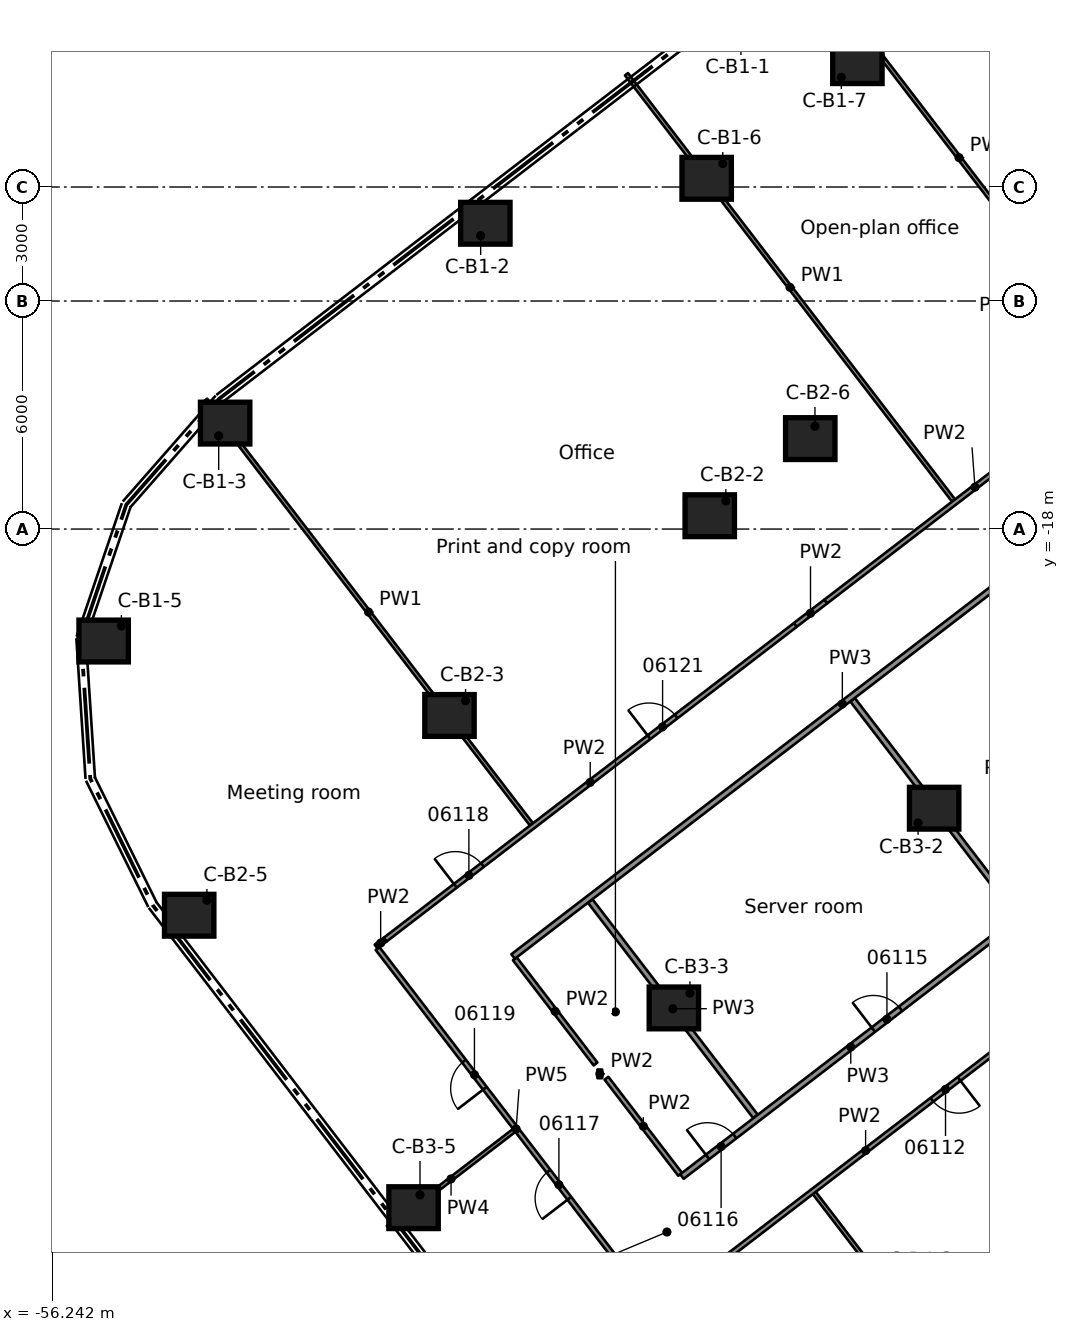
"""IFC4 building model, lengths in metres.
Left out: names, types, materials, properties, quantities, classifications, styles, units other than length and angle.
Written with IfcOpenShell. Run it as: python <this file> out.ifc"""

import sys

from ifc_helpers import new_model, si_unit, direction, frame, frame_2d, origin, origin_2d, place, context, subcontext, project, spatial, rectangle, extrude, element, fill, save


model = new_model("IFC4")
c1 = context("Model", 3, precision=1e-05, world=origin(), true_north=direction((0.0, 1.0)))
c2 = subcontext(c1, "Body", "Model", "MODEL_VIEW")
j1 = project(units=[si_unit("LENGTHUNIT", "METRE"), si_unit("PLANEANGLEUNIT", "RADIAN")], contexts=[c1])
p1 = place(None, origin())
s1 = spatial("IfcSite", under=j1, at=p1, CompositionType="ELEMENT")
p2 = place(p1, origin())
s2 = spatial("IfcBuilding", under=s1, at=p2, CompositionType="ELEMENT")
p3 = place(p2, frame((0.0, 0.0, 29.2)))
s3 = spatial("IfcBuildingStorey", under=s2, at=p3, CompositionType="ELEMENT", Elevation=29.2)
for number, where, z_axis, x_axis in (
    (1, (-44.84, -9.954, 0.0), (0.0, 0.0, 1.0), (1.0, 0.0, 0.0)),
    (2, (-51.687, -15.212, 0.0), (0.0, 0.0, 1.0), (1.0, 0.0, 0.0)),
    (3, (-54.884, -20.946, 0.0), (0.0, 0.0, 1.0), (1.0, 0.0, 0.0)),
    (4, (-39.016, -8.771, 0.0), (0.0, 0.0, 1.0), (1.0, 0.0, 0.0)),
    (5, (-35.05, -5.727, 0.0), (0.0, 0.0, 1.0), (1.0, 0.0, 0.0)),
    (6, (-38.935, -17.649, 0.0), (0.0, 0.0, 1.0), (1.0, 0.0, 0.0)),
    (7, (-45.784, -22.905, 0.0), (0.0, 0.0, 1.0), (1.0, 0.0, 0.0)),
    (8, (-52.633, -28.161, 0.0), (0.0, 0.0, 1.0), (1.0, 0.0, 0.0)),
    (9, (-36.29, -15.62, 0.0), (0.0, 0.0, 1.0), (1.0, 0.0, 0.0)),
    (10, (-33.03, -25.345, 0.0), (0.0, 0.0, 1.0), (1.0, 0.0, 0.0)),
    (11, (-39.879, -30.6, 0.0), (0.0, 0.0, 1.0), (1.0, 0.0, 0.0)),
    (12, (-46.729, -35.856, 0.0), (0.0, 0.0, 1.0), (1.0, 0.0, 0.0)),
):
    element("IfcColumn", number, at=place(p3, frame(where, z_axis=z_axis, x_axis=x_axis)), inside=s3, PredefinedType="COLUMN", context=c2, shape_type="SweptSolid", body=[
        extrude(rectangle(XDim=1.3, YDim=1.1, at=origin_2d()), origin(), (0.0, 0.0, 1.0), 4.1),
    ])
p4 = place(p3, frame((-40.384, -38.535, 0.0), z_axis=(0.0, 0.0, 1.0), x_axis=(-0.609026744184, 0.793149686294, 0.0)))
e13 = element("IfcWall", 13, at=p4, inside=s3, PredefinedType="PARTITIONING", context=c2, shape_type="SweptSolid", body=[
    extrude(rectangle(XDim=11.975, YDim=0.125, at=frame_2d((5.987, 0.0))), origin(), (0.0, 0.0, 1.0), 3.049),
])
p5 = place(p4, frame((3.688, 0.0, 0.0)))
e14 = element("IfcOpeningElement", 14, at=p5, cuts=e13, PredefinedType="OPENING", context=c2, shape_type="SweptSolid", body=[
    extrude(rectangle(XDim=0.9, YDim=2.1, at=frame_2d((0.45, 1.05))), frame((0.0, 0.073, 0.0), z_axis=(0.0, -1.0, 0.0), x_axis=(1.0, 0.0, 0.0)), (0.0, 0.0, 1.0), 0.145),
])
p6 = place(p4, frame((7.338, 0.0, 0.0)))
e15 = element("IfcOpeningElement", 15, at=p6, cuts=e13, PredefinedType="OPENING", context=c2, shape_type="SweptSolid", body=[
    extrude(rectangle(XDim=0.9, YDim=2.1, at=frame_2d((0.45, 1.05))), frame((0.0, 0.073, 0.0), z_axis=(0.0, -1.0, 0.0), x_axis=(1.0, 0.0, 0.0)), (0.0, 0.0, 1.0), 0.145),
])
p7 = place(p3, frame((-44.064, -29.307, 0.0), z_axis=(0.0, 0.0, 1.0), x_axis=(0.608587271244, -0.793486945879, 0.0)))
e16 = element("IfcWall", 16, at=p7, inside=s3, PredefinedType="PARTITIONING", context=c2, shape_type="SweptSolid", body=[
    extrude(rectangle(XDim=3.489, YDim=0.125, at=frame_2d((1.744, 0.0))), origin(), (0.0, 0.0, 1.0), 3.66),
])
p8 = place(p3, frame((-41.653, -32.45, 0.0), z_axis=(0.0, 0.0, 1.0), x_axis=(0.60867753108, -0.793417710389, 0.0)))
e17 = element("IfcWall", 17, at=p8, inside=s3, PredefinedType="PARTITIONING", context=c2, shape_type="SweptSolid", body=[
    extrude(rectangle(XDim=3.188, YDim=0.125, at=frame_2d((1.594, 0.0))), origin(), (0.0, 0.0, 1.0), 3.66),
])
p9 = place(p3, frame((-52.2, -14.599, 0.0), z_axis=(0.0, 0.0, 1.0), x_axis=(0.608818023879, -0.793309910312, 0.0)))
e18 = element("IfcWall", 18, at=p9, inside=s3, PredefinedType="PARTITIONING", context=c2, shape_type="SweptSolid", body=[
    extrude(rectangle(XDim=14.081, YDim=0.1, at=frame_2d((7.041, 0.0))), origin(), (0.0, 0.0, 1.0), 3.66),
])
p10 = place(p3, frame((-42.081, -27.786, 0.0), z_axis=(0.0, 0.0, 1.0), x_axis=(0.608779288924, -0.793339635577, 0.0)))
e19 = element("IfcWall", 19, at=p10, inside=s3, PredefinedType="PARTITIONING", context=c2, shape_type="SweptSolid", body=[
    extrude(rectangle(XDim=7.147, YDim=0.15, at=frame_2d((3.574, 0.0))), origin(), (0.0, 0.0, 1.0), 3.66),
])
p11 = place(p3, frame((-36.184, -35.471, 0.0), z_axis=(0.0, 0.0, 1.0), x_axis=(0.608732507749, -0.793375531517, 0.0)))
e20 = element("IfcWall", 20, at=p11, inside=s3, PredefinedType="PARTITIONING", context=c2, shape_type="SweptSolid", body=[
    extrude(rectangle(XDim=14.082, YDim=0.1, at=frame_2d((7.041, 0.0))), origin(), (0.0, 0.0, 1.0), 3.025),
])
p12 = place(p3, frame((-35.179, -22.489, 0.0), z_axis=(0.0, 0.0, 1.0), x_axis=(0.608729798771, -0.793377610024, 0.0)))
e21 = element("IfcWall", 21, at=p12, inside=s3, PredefinedType="PARTITIONING", context=c2, shape_type="SweptSolid", body=[
    extrude(rectangle(XDim=7.148, YDim=0.15, at=frame_2d((3.574, 0.0))), origin(), (0.0, 0.0, 1.0), 3.66),
])
p13 = place(p3, frame((-41.126, -6.033, 0.0), z_axis=(0.0, 0.0, 1.0), x_axis=(0.608775561638, -0.793342495743, 0.0)))
e22 = element("IfcWall", 22, at=p13, inside=s3, PredefinedType="PARTITIONING", context=c2, shape_type="SweptSolid", body=[
    extrude(rectangle(XDim=14.136, YDim=0.1, at=frame_2d((7.068, 0.0))), origin(), (0.0, 0.0, 1.0), 3.66),
])
p14 = place(p3, frame((-36.678, -2.62, 0.0), z_axis=(0.0, 0.0, 1.0), x_axis=(0.608783902678, -0.793336095132, 0.0)))
e23 = element("IfcWall", 23, at=p14, inside=s3, PredefinedType="PARTITIONING", context=c2, shape_type="SweptSolid", body=[
    extrude(rectangle(XDim=14.136, YDim=0.1, at=frame_2d((7.068, 0.0))), origin(), (0.0, 0.0, 1.0), 3.66),
])
p15 = place(p3, frame((-29.32, -30.127, 0.0), z_axis=(0.0, 0.0, 1.0), x_axis=(-0.793456491448, -0.608626976217, 0.0)))
e24 = element("IfcWall", 24, at=p15, inside=s3, PredefinedType="PARTITIONING", context=c2, shape_type="SweptSolid", body=[
    extrude(rectangle(XDim=13.898, YDim=0.125, at=frame_2d((6.949, 0.0))), origin(), (0.0, 0.0, 1.0), 3.66),
])
p16 = place(p15, frame((3.849, 0.0, 0.0)))
e25 = element("IfcOpeningElement", 25, at=p16, cuts=e24, PredefinedType="OPENING", context=c2, shape_type="SweptSolid", body=[
    extrude(rectangle(XDim=0.9, YDim=2.1, at=frame_2d((0.45, 1.05))), frame((0.0, 0.073, 0.0), z_axis=(0.0, -1.0, 0.0), x_axis=(1.0, 0.0, 0.0)), (0.0, 0.0, 1.0), 0.145),
])
p17 = place(p3, frame((-39.667, -35.038, 0.0), z_axis=(0.0, 0.0, 1.0), x_axis=(0.793293656215, 0.608839202917, 0.0)))
e26 = element("IfcWall", 26, at=p17, inside=s3, PredefinedType="PARTITIONING", context=c2, shape_type="SweptSolid", body=[
    extrude(rectangle(XDim=11.2, YDim=0.15, at=frame_2d((5.6, 0.0))), origin(), (0.0, 0.0, 1.0), 3.66),
])
p18 = place(p17, frame((6.35, 0.0, 0.0)))
e27 = element("IfcOpeningElement", 27, at=p18, cuts=e26, PredefinedType="OPENING", context=c2, shape_type="SweptSolid", body=[
    extrude(rectangle(XDim=0.9, YDim=2.1, at=frame_2d((0.45, 1.05))), frame((0.0, 0.085, 0.0), z_axis=(0.0, -1.0, 0.0), x_axis=(1.0, 0.0, 0.0)), (0.0, 0.0, 1.0), 0.17),
])
p19 = place(p17, frame((0.85, 0.0, 0.0)))
e28 = element("IfcOpeningElement", 28, at=p19, cuts=e26, PredefinedType="OPENING", context=c2, shape_type="SweptSolid", body=[
    extrude(rectangle(XDim=0.9, YDim=2.1, at=frame_2d((0.45, 1.05))), frame((0.0, 0.085, 0.0), z_axis=(0.0, -1.0, 0.0), x_axis=(1.0, 0.0, 0.0)), (0.0, 0.0, 1.0), 0.17),
])
p20 = place(p3, frame((-47.403, -36.374, 0.0), z_axis=(0.0, 0.0, 1.0), x_axis=(0.793154740431, 0.609020162008, 0.0)))
e29 = element("IfcWall", 29, at=p20, inside=s3, PredefinedType="PARTITIONING", context=c2, shape_type="SweptSolid", body=[
    extrude(rectangle(XDim=4.187, YDim=0.1, at=frame_2d((2.094, 0.0))), origin(), (0.0, 0.0, 1.0), 3.025),
])
p21 = place(p3, frame((-44.11, -29.247, 0.0), z_axis=(0.0, 0.0, 1.0), x_axis=(0.793471030698, 0.608608021179, 0.0)))
e30 = element("IfcWall", 30, at=p21, inside=s3, PredefinedType="PARTITIONING", context=c2, shape_type="SweptSolid", body=[
    extrude(rectangle(XDim=21.838, YDim=0.15, at=frame_2d((10.919, 0.0))), origin(), (0.0, 0.0, 1.0), 3.66),
])
p22 = place(p3, frame((-36.687, -20.524, 0.0), z_axis=(0.0, 0.0, 1.0), x_axis=(0.793579274907, 0.608466872096, 0.0)))
e31 = element("IfcWall", 31, at=p22, inside=s3, PredefinedType="PARTITIONING", context=c2, shape_type="SweptSolid", body=[
    extrude(rectangle(XDim=1.016, YDim=0.125, at=frame_2d((0.508, 0.0))), origin(), (0.0, 0.0, 1.0), 3.66),
])
p23 = place(p3, frame((-47.476, -28.803, 0.0), z_axis=(0.0, 0.0, 1.0), x_axis=(0.793430085013, 0.608661400284, 0.0)))
e32 = element("IfcWall", 32, at=p23, inside=s3, PredefinedType="PARTITIONING", context=c2, shape_type="SweptSolid", body=[
    extrude(rectangle(XDim=13.6, YDim=0.125, at=frame_2d((6.8, 0.0))), origin(), (0.0, 0.0, 1.0), 3.66),
])
p24 = place(p23, frame((2.326, 0.0, 0.0)))
e33 = element("IfcOpeningElement", 33, at=p24, cuts=e32, PredefinedType="OPENING", context=c2, shape_type="SweptSolid", body=[
    extrude(rectangle(XDim=0.9, YDim=2.1, at=frame_2d((0.45, 1.05))), frame((0.0, 0.073, 0.0), z_axis=(0.0, -1.0, 0.0), x_axis=(1.0, 0.0, 0.0)), (0.0, 0.0, 1.0), 0.145),
])
p25 = place(p23, frame((8.75, 0.0, 0.0)))
e34 = element("IfcOpeningElement", 34, at=p25, cuts=e32, PredefinedType="OPENING", context=c2, shape_type="SweptSolid", body=[
    extrude(rectangle(XDim=0.9, YDim=2.1, at=frame_2d((0.45, 1.05))), frame((0.0, 0.073, 0.0), z_axis=(0.0, -1.0, 0.0), x_axis=(1.0, 0.0, 0.0)), (0.0, 0.0, 1.0), 0.145),
])
p26 = place(p3, frame((-35.881, -19.906, 0.0), z_axis=(0.0, 0.0, 1.0), x_axis=(0.793491146474, 0.608581794394, 0.0)))
e35 = element("IfcWall", 35, at=p26, inside=s3, PredefinedType="PARTITIONING", context=c2, shape_type="SweptSolid", body=[
    extrude(rectangle(XDim=9.892, YDim=0.125, at=frame_2d((4.946, 0.0))), origin(), (0.0, 0.0, 1.0), 3.66),
])
p27 = place(p26, frame((6.634, 0.0, 0.0)))
e36 = element("IfcOpeningElement", 36, at=p27, cuts=e35, PredefinedType="OPENING", context=c2, shape_type="SweptSolid", body=[
    extrude(rectangle(XDim=1.1, YDim=2.1, at=frame_2d((0.55, 1.05))), frame((0.0, 0.073, 0.0), z_axis=(0.0, -1.0, 0.0), x_axis=(1.0, 0.0, 0.0)), (0.0, 0.0, 1.0), 0.145),
])
p28 = place(p3, frame((-47.714, -28.986, 0.0), z_axis=(0.0, 0.0, 1.0), x_axis=(0.792623989105, 0.60971076085, 0.0)))
e37 = element("IfcWall", 37, at=p28, inside=s3, PredefinedType="PARTITIONING", context=c2, shape_type="SweptSolid", body=[
    extrude(rectangle(XDim=0.3, YDim=0.125, at=frame_2d((0.15, 0.0))), origin(), (0.0, 0.0, 1.0), 3.66),
])
p29 = place(p3, frame((-41.828, -32.449, 0.0), z_axis=(0.0, 0.0, 1.0), x_axis=(0.0, 1.0, 0.0)))
e38 = element("IfcWall", 38, at=p29, inside=s3, PredefinedType="PARTITIONING", context=c2, shape_type="SweptSolid", body=[
    extrude(rectangle(XDim=0.228, YDim=0.125, at=frame_2d((0.114, 0.0))), origin(), (0.0, 0.0, 1.0), 3.66),
])
p30 = place(p16, origin())
e39 = element("IfcDoor", 39, at=p30, inside=s3, OperationType="SINGLE_SWING_LEFT", PredefinedType="DOOR", context=c2, shape_type="SweptSolid", body=[
    extrude(rectangle(XDim=0.9, YDim=2.1, at=frame_2d((0.45, 1.05))), frame((0.0, 0.025, 0.0), z_axis=(0.0, -1.0, 0.0), x_axis=(1.0, 0.0, 0.0)), (0.0, 0.0, 1.0), 0.05),
])
fill(e25, e39)
p31 = place(p18, origin())
e40 = element("IfcDoor", 40, at=p31, inside=s3, OperationType="SINGLE_SWING_RIGHT", PredefinedType="DOOR", context=c2, shape_type="SweptSolid", body=[
    extrude(rectangle(XDim=0.9, YDim=2.1, at=frame_2d((0.45, 1.05))), frame((0.0, 0.025, 0.0), z_axis=(0.0, -1.0, 0.0), x_axis=(1.0, 0.0, 0.0)), (0.0, 0.0, 1.0), 0.05),
])
fill(e27, e40)
p32 = place(p19, origin())
e41 = element("IfcDoor", 41, at=p32, inside=s3, OperationType="SINGLE_SWING_LEFT", PredefinedType="DOOR", context=c2, shape_type="SweptSolid", body=[
    extrude(rectangle(XDim=0.9, YDim=2.1, at=frame_2d((0.45, 1.05))), frame((0.0, 0.025, 0.0), z_axis=(0.0, -1.0, 0.0), x_axis=(1.0, 0.0, 0.0)), (0.0, 0.0, 1.0), 0.05),
])
fill(e28, e41)
p33 = place(p5, origin())
e42 = element("IfcDoor", 42, at=p33, inside=s3, OperationType="SINGLE_SWING_LEFT", PredefinedType="DOOR", context=c2, shape_type="SweptSolid", body=[
    extrude(rectangle(XDim=0.9, YDim=2.1, at=frame_2d((0.45, 1.05))), frame((0.0, 0.025, 0.0), z_axis=(0.0, -1.0, 0.0), x_axis=(1.0, 0.0, 0.0)), (0.0, 0.0, 1.0), 0.05),
])
fill(e14, e42)
p34 = place(p24, origin())
e43 = element("IfcDoor", 43, at=p34, inside=s3, OperationType="SINGLE_SWING_LEFT", PredefinedType="DOOR", context=c2, shape_type="SweptSolid", body=[
    extrude(rectangle(XDim=0.9, YDim=2.1, at=frame_2d((0.45, 1.05))), frame((0.0, 0.025, 0.0), z_axis=(0.0, -1.0, 0.0), x_axis=(1.0, 0.0, 0.0)), (0.0, 0.0, 1.0), 0.05),
])
fill(e33, e43)
p35 = place(p6, origin())
e44 = element("IfcDoor", 44, at=p35, inside=s3, OperationType="SINGLE_SWING_RIGHT", PredefinedType="DOOR", context=c2, shape_type="SweptSolid", body=[
    extrude(rectangle(XDim=0.9, YDim=2.1, at=frame_2d((0.45, 1.05))), frame((0.0, 0.025, 0.0), z_axis=(0.0, -1.0, 0.0), x_axis=(1.0, 0.0, 0.0)), (0.0, 0.0, 1.0), 0.05),
])
fill(e15, e44)
p36 = place(p25, origin())
e45 = element("IfcDoor", 45, at=p36, inside=s3, OperationType="SINGLE_SWING_RIGHT", PredefinedType="DOOR", context=c2, shape_type="SweptSolid", body=[
    extrude(rectangle(XDim=0.9, YDim=2.1, at=frame_2d((0.45, 1.05))), frame((0.0, 0.025, 0.0), z_axis=(0.0, -1.0, 0.0), x_axis=(1.0, 0.0, 0.0)), (0.0, 0.0, 1.0), 0.05),
])
fill(e34, e45)
save(model, sys.argv[1])
